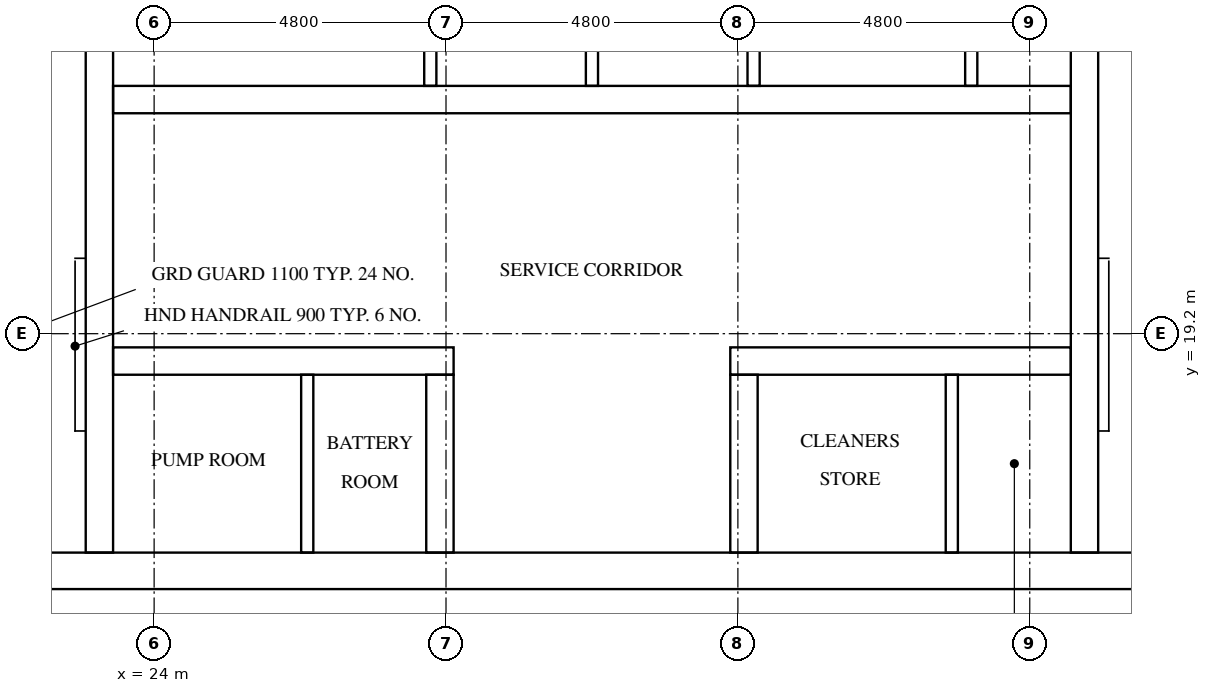
"""IFC4 building model, lengths in metres.
Left out: names, types, materials, properties, quantities, classifications, styles, units other than length and angle.
Written with IfcOpenShell. Run it as: python <this file> out.ifc"""

import sys

from ifc_helpers import new_model, si_unit, direction, frame, frame_2d, origin, place, context, subcontext, project, spatial, rectangle, extrude, element, fill, save


model = new_model("IFC4")
c1 = context("Model", 3, precision=1e-05, world=origin(), true_north=direction((0.0, 1.0)))
c2 = subcontext(c1, "Body", "Model", "MODEL_VIEW")
j1 = project(units=[si_unit("LENGTHUNIT", "METRE"), si_unit("PLANEANGLEUNIT", "RADIAN")], contexts=[c1])
p1 = place(None, origin())
s1 = spatial("IfcSite", under=j1, at=p1, CompositionType="ELEMENT")
p2 = place(p1, origin())
s2 = spatial("IfcBuilding", under=s1, at=p2, CompositionType="ELEMENT")
p3 = place(p2, frame((0.0, 0.0, 249.2)))
s3 = spatial("IfcBuildingStorey", under=s2, at=p3, CompositionType="ELEMENT", Elevation=249.2)
p4 = place(p3, frame((15.0, 15.3, 0.0), z_axis=(0.0, 0.0, 1.0), x_axis=(1.0, 0.0, 0.0)))
e1 = element("IfcWall", 1, at=p4, inside=s3, PredefinedType="SHEAR", context=c2, shape_type="SweptSolid", body=[
    extrude(rectangle(XDim=32.4, YDim=0.6, at=frame_2d((16.2, 0.0))), origin(), (0.0, 0.0, 1.0), 3.2),
])
p5 = place(p4, frame((15.3, 0.0, 0.0)))
e2 = element("IfcOpeningElement", 2, at=p5, cuts=e1, PredefinedType="OPENING", context=c2, shape_type="SweptSolid", body=[
    extrude(rectangle(XDim=1.8, YDim=2.1, at=frame_2d((0.9, 1.05))), frame((0.0, 0.31, 0.0), z_axis=(0.0, -1.0, 0.0), x_axis=(1.0, 0.0, 0.0)), (0.0, 0.0, 1.0), 0.62),
])
p6 = place(p3, frame((23.1, 15.6, 0.0), z_axis=(0.0, 0.0, 1.0), x_axis=(0.0, 1.0, 0.0)))
e3 = element("IfcWall", 3, at=p6, inside=s3, PredefinedType="SHEAR", context=c2, shape_type="SweptSolid", body=[
    extrude(rectangle(XDim=21.6, YDim=0.45, at=frame_2d((10.8, 0.0))), origin(), (0.0, 0.0, 1.0), 3.2),
])
p7 = place(p3, frame((39.3, 15.6, 0.0), z_axis=(0.0, 0.0, 1.0), x_axis=(0.0, 1.0, 0.0)))
e4 = element("IfcWall", 4, at=p7, inside=s3, PredefinedType="SHEAR", context=c2, shape_type="SweptSolid", body=[
    extrude(rectangle(XDim=8.65, YDim=0.45, at=frame_2d((4.325, 0.0))), origin(), (0.0, 0.0, 1.0), 3.2),
])
p8 = place(p3, frame((23.325, 18.75, 0.0), z_axis=(0.0, 0.0, 1.0), x_axis=(1.0, 0.0, 0.0)))
e5 = element("IfcWall", 5, at=p8, inside=s3, PredefinedType="SHEAR", context=c2, shape_type="SweptSolid", body=[
    extrude(rectangle(XDim=5.6, YDim=0.45, at=frame_2d((2.8, 0.0))), origin(), (0.0, 0.0, 1.0), 3.2),
])
p9 = place(p8, frame((1.046, 0.0, 0.0)))
e6 = element("IfcOpeningElement", 6, at=p9, cuts=e5, PredefinedType="OPENING", context=c2, shape_type="SweptSolid", body=[
    extrude(rectangle(XDim=1.0, YDim=2.1, at=frame_2d((0.5, 1.05))), frame((0.0, 0.235, 0.0), z_axis=(0.0, -1.0, 0.0), x_axis=(1.0, 0.0, 0.0)), (0.0, 0.0, 1.0), 0.47),
])
p10 = place(p8, frame((3.721, 0.0, 0.0)))
e7 = element("IfcOpeningElement", 7, at=p10, cuts=e5, PredefinedType="OPENING", context=c2, shape_type="SweptSolid", body=[
    extrude(rectangle(XDim=1.0, YDim=2.1, at=frame_2d((0.5, 1.05))), frame((0.0, 0.235, 0.0), z_axis=(0.0, -1.0, 0.0), x_axis=(1.0, 0.0, 0.0)), (0.0, 0.0, 1.0), 0.47),
])
p11 = place(p3, frame((33.475, 18.75, 0.0), z_axis=(0.0, 0.0, 1.0), x_axis=(1.0, 0.0, 0.0)))
e8 = element("IfcWall", 8, at=p11, inside=s3, PredefinedType="SHEAR", context=c2, shape_type="SweptSolid", body=[
    extrude(rectangle(XDim=5.6, YDim=0.45, at=frame_2d((2.8, 0.0))), origin(), (0.0, 0.0, 1.0), 3.2),
])
p12 = place(p11, frame((1.497, 0.0, 0.0)))
e9 = element("IfcOpeningElement", 9, at=p12, cuts=e8, PredefinedType="OPENING", context=c2, shape_type="SweptSolid", body=[
    extrude(rectangle(XDim=1.0, YDim=2.1, at=frame_2d((0.5, 1.05))), frame((0.0, 0.235, 0.0), z_axis=(0.0, -1.0, 0.0), x_axis=(1.0, 0.0, 0.0)), (0.0, 0.0, 1.0), 0.47),
])
p13 = place(p11, frame((4.171, 0.0, 0.0)))
e10 = element("IfcOpeningElement", 10, at=p13, cuts=e8, PredefinedType="OPENING", context=c2, shape_type="SweptSolid", body=[
    extrude(rectangle(XDim=1.0, YDim=2.1, at=frame_2d((0.5, 1.05))), frame((0.0, 0.235, 0.0), z_axis=(0.0, -1.0, 0.0), x_axis=(1.0, 0.0, 0.0)), (0.0, 0.0, 1.0), 0.47),
])
p14 = place(p3, frame((23.325, 23.05, 0.0), z_axis=(0.0, 0.0, 1.0), x_axis=(1.0, 0.0, 0.0)))
e11 = element("IfcWall", 11, at=p14, inside=s3, PredefinedType="SHEAR", context=c2, shape_type="SweptSolid", body=[
    extrude(rectangle(XDim=15.75, YDim=0.45, at=frame_2d((7.875, 0.0))), origin(), (0.0, 0.0, 1.0), 3.2),
])
p15 = place(p14, frame((2.058, 0.0, 0.0)))
e12 = element("IfcOpeningElement", 12, at=p15, cuts=e11, PredefinedType="OPENING", context=c2, shape_type="SweptSolid", body=[
    extrude(rectangle(XDim=1.0, YDim=2.1, at=frame_2d((0.5, 1.05))), frame((0.0, 0.235, 0.0), z_axis=(0.0, -1.0, 0.0), x_axis=(1.0, 0.0, 0.0)), (0.0, 0.0, 1.0), 0.47),
])
p16 = place(p14, frame((11.823, 0.0, 0.0)))
e13 = element("IfcOpeningElement", 13, at=p16, cuts=e11, PredefinedType="OPENING", context=c2, shape_type="SweptSolid", body=[
    extrude(rectangle(XDim=1.0, YDim=2.1, at=frame_2d((0.5, 1.05))), frame((0.0, 0.235, 0.0), z_axis=(0.0, -1.0, 0.0), x_axis=(1.0, 0.0, 0.0)), (0.0, 0.0, 1.0), 0.47),
])
p17 = place(p14, frame((14.481, 0.0, 0.0)))
e14 = element("IfcOpeningElement", 14, at=p17, cuts=e11, PredefinedType="OPENING", context=c2, shape_type="SweptSolid", body=[
    extrude(rectangle(XDim=1.0, YDim=2.1, at=frame_2d((0.5, 1.05))), frame((0.0, 0.235, 0.0), z_axis=(0.0, -1.0, 0.0), x_axis=(1.0, 0.0, 0.0)), (0.0, 0.0, 1.0), 0.47),
])
for number, where, z_axis, x_axis in (
    (15, (28.7, 15.6, 0.0), (0.0, 0.0, 1.0), (0.0, 1.0, 0.0)),
    (16, (33.7, 15.6, 0.0), (0.0, 0.0, 1.0), (0.0, 1.0, 0.0)),
):
    element("IfcWall", number, at=place(p3, frame(where, z_axis=z_axis, x_axis=x_axis)), inside=s3, PredefinedType="SHEAR", context=c2, shape_type="SweptSolid", body=[
        extrude(rectangle(XDim=2.925, YDim=0.45, at=frame_2d((1.462, 0.0))), origin(), (0.0, 0.0, 1.0), 3.2),
    ])
for number, where, z_axis, x_axis in (
    (17, (28.542, 23.275, 0.0), (0.0, 0.0, 1.0), (0.0, 1.0, 0.0)),
    (18, (31.2, 23.275, 0.0), (0.0, 0.0, 1.0), (0.0, 1.0, 0.0)),
    (19, (33.858, 23.275, 0.0), (0.0, 0.0, 1.0), (0.0, 1.0, 0.0)),
):
    element("IfcWall", number, at=place(p3, frame(where, z_axis=z_axis, x_axis=x_axis)), inside=s3, PredefinedType="SOLIDWALL", context=c2, shape_type="SweptSolid", body=[
        extrude(rectangle(XDim=2.65, YDim=0.2, at=frame_2d((1.325, 0.0))), origin(), (0.0, 0.0, 1.0), 3.2),
    ])
p18 = place(p3, frame((37.438, 23.275, 0.0), z_axis=(0.0, 0.0, 1.0), x_axis=(0.0, 1.0, 0.0)))
e20 = element("IfcWall", 20, at=p18, inside=s3, PredefinedType="PARTITIONING", context=c2, shape_type="SweptSolid", body=[
    extrude(rectangle(XDim=2.65, YDim=0.2, at=frame_2d((1.325, 0.0))), origin(), (0.0, 0.0, 1.0), 3.2),
])
for number, where, z_axis, x_axis in (
    (21, (26.518, 15.6, 0.0), (0.0, 0.0, 1.0), (0.0, 1.0, 0.0)),
    (22, (37.118, 15.6, 0.0), (0.0, 0.0, 1.0), (0.0, 1.0, 0.0)),
):
    element("IfcWall", number, at=place(p3, frame(where, z_axis=z_axis, x_axis=x_axis)), inside=s3, PredefinedType="PARTITIONING", context=c2, shape_type="SweptSolid", body=[
        extrude(rectangle(XDim=2.925, YDim=0.2, at=frame_2d((1.462, 0.0))), origin(), (0.0, 0.0, 1.0), 3.2),
    ])
p19 = place(p5, frame((1.8, 0.0, 0.0), z_axis=(0.0, 0.0, 1.0), x_axis=(-1.0, 0.0, 0.0)))
e23 = element("IfcDoor", 23, at=p19, inside=s3, OperationType="DOUBLE_DOOR_SINGLE_SWING", PredefinedType="DOOR", context=c2, shape_type="SweptSolid", body=[
    extrude(rectangle(XDim=1.8, YDim=2.1, at=frame_2d((0.9, 1.05))), frame((0.0, 0.025, 0.0), z_axis=(0.0, -1.0, 0.0), x_axis=(1.0, 0.0, 0.0)), (0.0, 0.0, 1.0), 0.05),
])
fill(e2, e23)
p20 = place(p15, frame((1.0, 0.0, 0.0), z_axis=(0.0, 0.0, 1.0), x_axis=(-1.0, 0.0, 0.0)))
e24 = element("IfcDoor", 24, at=p20, inside=s3, OperationType="SINGLE_SWING_RIGHT", PredefinedType="DOOR", context=c2, shape_type="SweptSolid", body=[
    extrude(rectangle(XDim=1.0, YDim=2.1, at=frame_2d((0.5, 1.05))), frame((0.0, 0.025, 0.0), z_axis=(0.0, -1.0, 0.0), x_axis=(1.0, 0.0, 0.0)), (0.0, 0.0, 1.0), 0.05),
])
fill(e12, e24)
p21 = place(p16, frame((1.0, 0.0, 0.0), z_axis=(0.0, 0.0, 1.0), x_axis=(-1.0, 0.0, 0.0)))
e25 = element("IfcDoor", 25, at=p21, inside=s3, OperationType="SINGLE_SWING_LEFT", PredefinedType="DOOR", context=c2, shape_type="SweptSolid", body=[
    extrude(rectangle(XDim=1.0, YDim=2.1, at=frame_2d((0.5, 1.05))), frame((0.0, 0.025, 0.0), z_axis=(0.0, -1.0, 0.0), x_axis=(1.0, 0.0, 0.0)), (0.0, 0.0, 1.0), 0.05),
])
fill(e13, e25)
p22 = place(p17, frame((1.0, 0.0, 0.0), z_axis=(0.0, 0.0, 1.0), x_axis=(-1.0, 0.0, 0.0)))
e26 = element("IfcDoor", 26, at=p22, inside=s3, OperationType="SINGLE_SWING_RIGHT", PredefinedType="DOOR", context=c2, shape_type="SweptSolid", body=[
    extrude(rectangle(XDim=1.0, YDim=2.1, at=frame_2d((0.5, 1.05))), frame((0.0, 0.025, 0.0), z_axis=(0.0, -1.0, 0.0), x_axis=(1.0, 0.0, 0.0)), (0.0, 0.0, 1.0), 0.05),
])
fill(e14, e26)
p23 = place(p9, origin())
e27 = element("IfcDoor", 27, at=p23, inside=s3, OperationType="SINGLE_SWING_LEFT", PredefinedType="DOOR", context=c2, shape_type="SweptSolid", body=[
    extrude(rectangle(XDim=1.0, YDim=2.1, at=frame_2d((0.5, 1.05))), frame((0.0, 0.025, 0.0), z_axis=(0.0, -1.0, 0.0), x_axis=(1.0, 0.0, 0.0)), (0.0, 0.0, 1.0), 0.05),
])
fill(e6, e27)
p24 = place(p10, origin())
e28 = element("IfcDoor", 28, at=p24, inside=s3, OperationType="SINGLE_SWING_RIGHT", PredefinedType="DOOR", context=c2, shape_type="SweptSolid", body=[
    extrude(rectangle(XDim=1.0, YDim=2.1, at=frame_2d((0.5, 1.05))), frame((0.0, 0.025, 0.0), z_axis=(0.0, -1.0, 0.0), x_axis=(1.0, 0.0, 0.0)), (0.0, 0.0, 1.0), 0.05),
])
fill(e7, e28)
p25 = place(p12, origin())
e29 = element("IfcDoor", 29, at=p25, inside=s3, OperationType="SINGLE_SWING_LEFT", PredefinedType="DOOR", context=c2, shape_type="SweptSolid", body=[
    extrude(rectangle(XDim=1.0, YDim=2.1, at=frame_2d((0.5, 1.05))), frame((0.0, 0.025, 0.0), z_axis=(0.0, -1.0, 0.0), x_axis=(1.0, 0.0, 0.0)), (0.0, 0.0, 1.0), 0.05),
])
fill(e9, e29)
p26 = place(p13, origin())
e30 = element("IfcDoor", 30, at=p26, inside=s3, OperationType="SINGLE_SWING_RIGHT", PredefinedType="DOOR", context=c2, shape_type="SweptSolid", body=[
    extrude(rectangle(XDim=1.0, YDim=2.1, at=frame_2d((0.5, 1.05))), frame((0.0, 0.025, 0.0), z_axis=(0.0, -1.0, 0.0), x_axis=(1.0, 0.0, 0.0)), (0.0, 0.0, 1.0), 0.05),
])
fill(e10, e30)
save(model, sys.argv[1])
